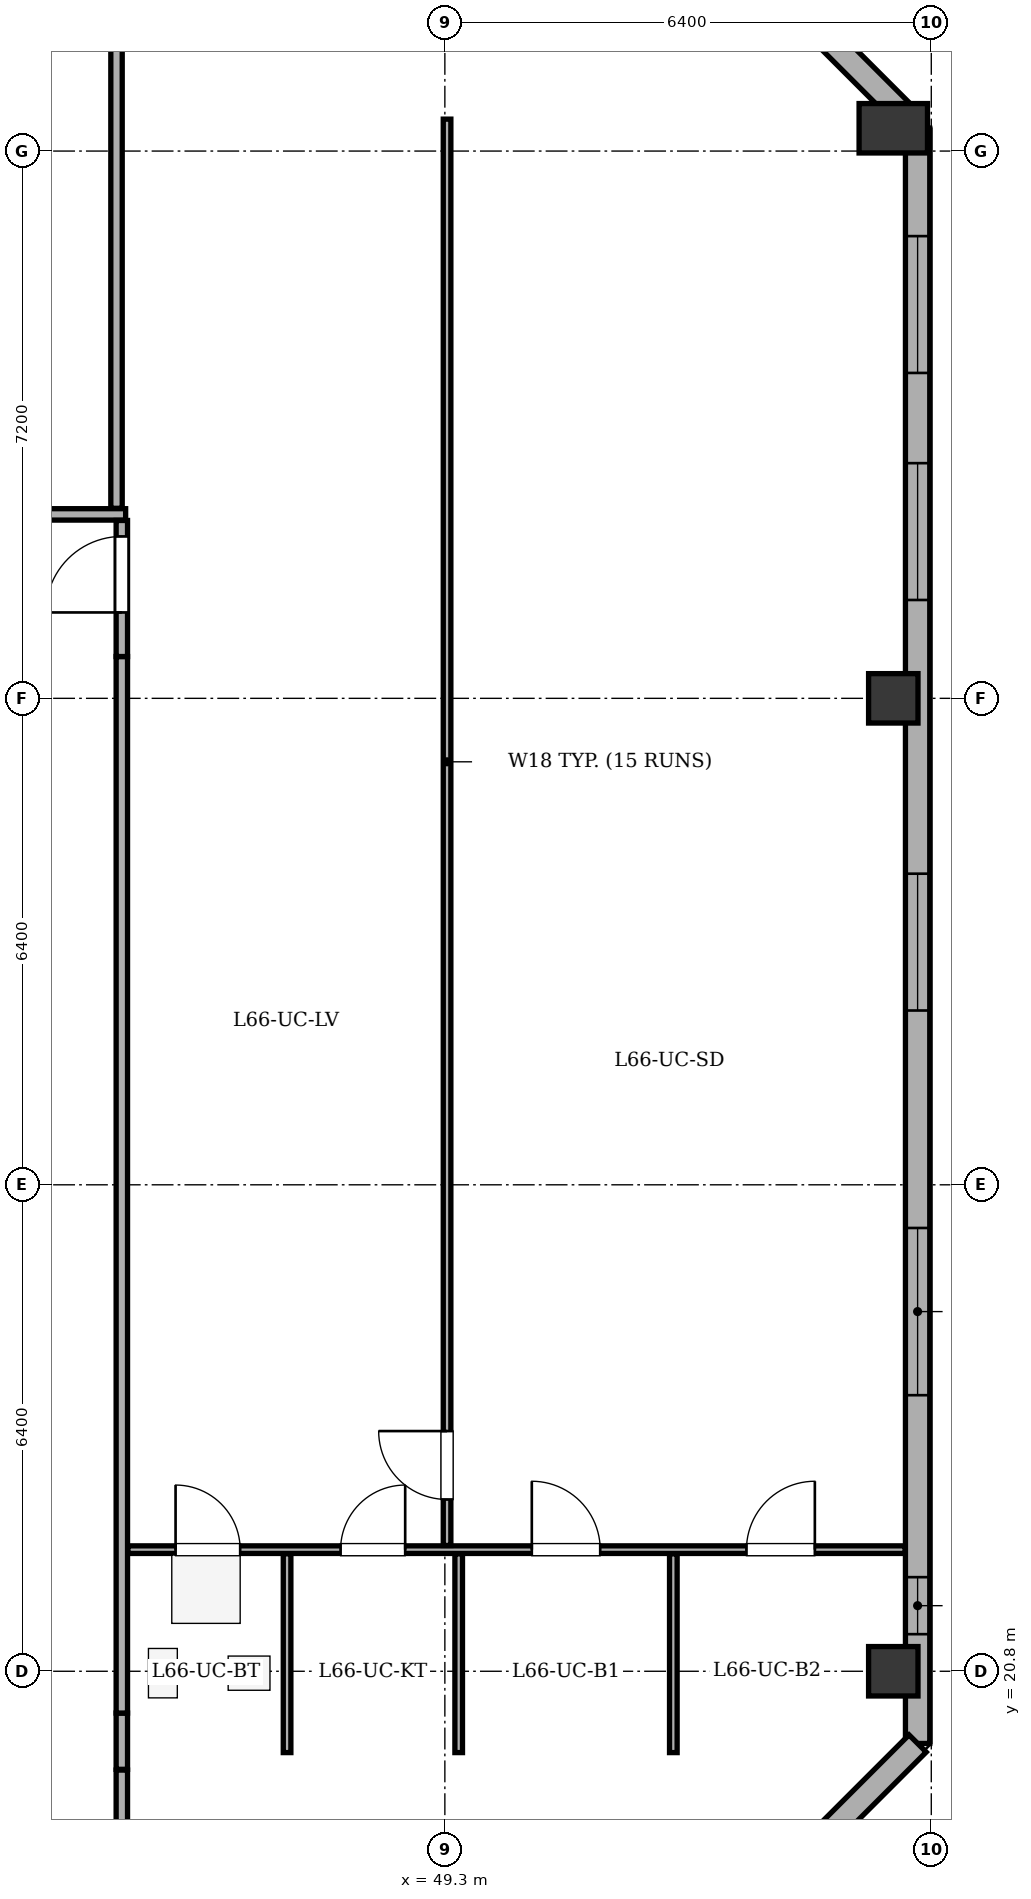
"""IFC4 building model, lengths in metres.
Left out: names, types, materials, properties, quantities, classifications, styles, units other than length and angle.
Written with IfcOpenShell. Run it as: python <this file> out.ifc"""

import sys

from ifc_helpers import new_model, si_unit, direction, frame, frame_2d, origin, origin_2d, place, context, subcontext, project, spatial, rectangle, extrude, element, fill, save


model = new_model("IFC4")
c1 = context("Model", 3, precision=1e-05, world=origin(), true_north=direction((0.0, 1.0)))
c2 = subcontext(c1, "Body", "Model", "MODEL_VIEW")
j1 = project(units=[si_unit("LENGTHUNIT", "METRE"), si_unit("PLANEANGLEUNIT", "RADIAN")], contexts=[c1])
p1 = place(None, origin())
s1 = spatial("IfcSite", under=j1, at=p1, CompositionType="ELEMENT")
p2 = place(p1, origin())
s2 = spatial("IfcBuilding", under=s1, at=p2, CompositionType="ELEMENT")
p3 = place(p2, frame((0.0, 0.0, 251.7)))
s3 = spatial("IfcBuildingStorey", under=s2, at=p3, CompositionType="ELEMENT", Elevation=251.7)
for number, where, z_axis, x_axis in (
    (1, (55.2, 20.8, 0.0), (0.0, 0.0, 1.0), (1.0, 0.0, 0.0)),
    (2, (55.2, 33.6, 0.0), (0.0, 0.0, 1.0), (1.0, 0.0, 0.0)),
):
    element("IfcColumn", number, at=place(p3, frame(where, z_axis=z_axis, x_axis=x_axis)), inside=s3, PredefinedType="COLUMN", context=c2, shape_type="SweptSolid", body=[
        extrude(rectangle(XDim=0.65, YDim=0.65, at=origin_2d()), origin(), (0.0, 0.0, 1.0), 3.4),
    ])
p4 = place(p3, frame((55.2, 41.1, 0.0), z_axis=(0.0, 0.0, 1.0), x_axis=(1.0, 0.0, 0.0)))
e3 = element("IfcColumn", 3, at=p4, inside=s3, PredefinedType="COLUMN", context=c2, shape_type="SweptSolid", body=[
    extrude(rectangle(XDim=0.65, YDim=0.9, at=origin_2d()), origin(), (0.0, 0.0, 1.0), 3.4),
])
p5 = place(p3, frame((51.7, 44.92, 0.0), z_axis=(0.0, 0.0, 1.0), x_axis=(0.70712937715, -0.707084184501, 0.0)))
e4 = element("IfcWall", 4, at=p5, inside=s3, PredefinedType="STANDARD", context=c2, shape_type="SweptSolid", body=[
    extrude(rectangle(XDim=5.402, YDim=0.32, at=frame_2d((2.701, 0.0))), origin(), (0.0, 0.0, 1.0), 2.725),
])
p6 = place(p5, frame((2.001, 0.0, 0.75)))
e5 = element("IfcOpeningElement", 5, at=p6, cuts=e4, PredefinedType="OPENING", context=c2, shape_type="SweptSolid", body=[
    extrude(rectangle(XDim=1.4, YDim=1.65, at=frame_2d((0.7, 0.825))), frame((0.0, 0.17, 0.0), z_axis=(0.0, -1.0, 0.0), x_axis=(1.0, 0.0, 0.0)), (0.0, 0.0, 1.0), 0.34),
])
p7 = place(p3, frame((55.52, 41.1, 0.0), z_axis=(0.0, 0.0, 1.0), x_axis=(0.0, -1.0, 0.0)))
e6 = element("IfcWall", 6, at=p7, inside=s3, PredefinedType="STANDARD", context=c2, shape_type="SweptSolid", body=[
    extrude(rectangle(XDim=21.25, YDim=0.32, at=frame_2d((10.625, 0.0))), origin(), (0.0, 0.0, 1.0), 2.725),
])
p8 = place(p7, frame((1.419, 0.0, 0.75)))
e7 = element("IfcOpeningElement", 7, at=p8, cuts=e6, PredefinedType="OPENING", context=c2, shape_type="SweptSolid", body=[
    extrude(rectangle(XDim=1.8, YDim=1.7, at=frame_2d((0.9, 0.85))), frame((0.0, 0.17, 0.0), z_axis=(0.0, -1.0, 0.0), x_axis=(1.0, 0.0, 0.0)), (0.0, 0.0, 1.0), 0.34),
])
p9 = place(p7, frame((4.406, 0.0, 0.75)))
e8 = element("IfcOpeningElement", 8, at=p9, cuts=e6, PredefinedType="OPENING", context=c2, shape_type="SweptSolid", body=[
    extrude(rectangle(XDim=1.8, YDim=1.7, at=frame_2d((0.9, 0.85))), frame((0.0, 0.17, 0.0), z_axis=(0.0, -1.0, 0.0), x_axis=(1.0, 0.0, 0.0)), (0.0, 0.0, 1.0), 0.34),
])
p10 = place(p7, frame((9.807, 0.0, 0.75)))
e9 = element("IfcOpeningElement", 9, at=p10, cuts=e6, PredefinedType="OPENING", context=c2, shape_type="SweptSolid", body=[
    extrude(rectangle(XDim=1.8, YDim=1.7, at=frame_2d((0.9, 0.85))), frame((0.0, 0.17, 0.0), z_axis=(0.0, -1.0, 0.0), x_axis=(1.0, 0.0, 0.0)), (0.0, 0.0, 1.0), 0.34),
])
p11 = place(p7, frame((14.468, 0.0, 0.75)))
e10 = element("IfcOpeningElement", 10, at=p11, cuts=e6, PredefinedType="OPENING", context=c2, shape_type="SweptSolid", body=[
    extrude(rectangle(XDim=2.2, YDim=1.7, at=frame_2d((1.1, 0.85))), frame((0.0, 0.17, 0.0), z_axis=(0.0, -1.0, 0.0), x_axis=(1.0, 0.0, 0.0)), (0.0, 0.0, 1.0), 0.34),
])
p12 = place(p7, frame((19.062, 0.0, 0.75)))
e11 = element("IfcOpeningElement", 11, at=p12, cuts=e6, PredefinedType="OPENING", context=c2, shape_type="SweptSolid", body=[
    extrude(rectangle(XDim=0.75, YDim=1.45, at=frame_2d((0.375, 0.725))), frame((0.0, 0.17, 0.0), z_axis=(0.0, -1.0, 0.0), x_axis=(1.0, 0.0, 0.0)), (0.0, 0.0, 1.0), 0.34),
])
p13 = place(p3, frame((55.52, 19.85, 0.0), z_axis=(0.0, 0.0, 1.0), x_axis=(-0.707106781187, -0.707106781187, 0.0)))
e12 = element("IfcWall", 12, at=p13, inside=s3, PredefinedType="STANDARD", context=c2, shape_type="SweptSolid", body=[
    extrude(rectangle(XDim=5.402, YDim=0.32, at=frame_2d((2.701, 0.0))), origin(), (0.0, 0.0, 1.0), 2.725),
])
p14 = place(p13, frame((2.001, 0.0, 0.75)))
e13 = element("IfcOpeningElement", 13, at=p14, cuts=e12, PredefinedType="OPENING", context=c2, shape_type="SweptSolid", body=[
    extrude(rectangle(XDim=1.4, YDim=1.65, at=frame_2d((0.7, 0.825))), frame((0.0, 0.17, 0.0), z_axis=(0.0, -1.0, 0.0), x_axis=(1.0, 0.0, 0.0)), (0.0, 0.0, 1.0), 0.34),
])
p15 = place(p3, frame((14.58, 36.02, 0.0), z_axis=(0.0, 0.0, 1.0), x_axis=(1.0, 0.0, 0.0)))
e14 = element("IfcWall", 14, at=p15, inside=s3, PredefinedType="PARTITIONING", context=c2, shape_type="SweptSolid", body=[
    extrude(rectangle(XDim=30.52, YDim=0.15, at=frame_2d((15.26, 0.0))), origin(), (0.0, 0.0, 1.0), 3.1),
])
p16 = place(p15, frame((6.585, 0.0, 0.0)))
e15 = element("IfcOpeningElement", 15, at=p16, cuts=e14, PredefinedType="OPENING", context=c2, shape_type="SweptSolid", body=[
    extrude(rectangle(XDim=1.0, YDim=2.1, at=frame_2d((0.5, 1.05))), frame((0.0, 0.085, 0.0), z_axis=(0.0, -1.0, 0.0), x_axis=(1.0, 0.0, 0.0)), (0.0, 0.0, 1.0), 0.17),
])
p17 = place(p15, frame((21.724, 0.0, 0.0)))
e16 = element("IfcOpeningElement", 16, at=p17, cuts=e14, PredefinedType="OPENING", context=c2, shape_type="SweptSolid", body=[
    extrude(rectangle(XDim=1.0, YDim=2.1, at=frame_2d((0.5, 1.05))), frame((0.0, 0.085, 0.0), z_axis=(0.0, -1.0, 0.0), x_axis=(1.0, 0.0, 0.0)), (0.0, 0.0, 1.0), 0.17),
])
p18 = place(p3, frame((44.98, 36.1, 0.0), z_axis=(0.0, 0.0, 1.0), x_axis=(0.0, 1.0, 0.0)))
e17 = element("IfcWall", 17, at=p18, inside=s3, PredefinedType="PARTITIONING", context=c2, shape_type="SweptSolid", body=[
    extrude(rectangle(XDim=8.655, YDim=0.15, at=frame_2d((4.327, 0.0))), origin(), (0.0, 0.0, 1.0), 2.725),
])
p19 = place(p3, frame((45.05, 19.5, 0.0), z_axis=(0.0, 0.0, 1.0), x_axis=(0.0, -1.0, 0.0)))
e18 = element("IfcWall", 18, at=p19, inside=s3, PredefinedType="PARTITIONING", context=c2, shape_type="SweptSolid", body=[
    extrude(rectangle(XDim=0.96, YDim=0.15, at=frame_2d((0.48, 0.0))), origin(), (0.0, 0.0, 1.0), 2.725),
])
p20 = place(p3, frame((45.05, 19.51, 0.0), z_axis=(0.0, 0.0, 1.0), x_axis=(0.0, 1.0, 0.0)))
e19 = element("IfcWall", 19, at=p20, inside=s3, PredefinedType="PARTITIONING", context=c2, shape_type="SweptSolid", body=[
    extrude(rectangle(XDim=0.74, YDim=0.15, at=frame_2d((0.37, 0.0))), origin(), (0.0, 0.0, 1.0), 2.725),
])
p21 = place(p3, frame((45.05, 20.25, 0.0), z_axis=(0.0, 0.0, 1.0), x_axis=(0.0, 1.0, 0.0)))
e20 = element("IfcWall", 20, at=p21, inside=s3, PredefinedType="PARTITIONING", context=c2, shape_type="SweptSolid", body=[
    extrude(rectangle(XDim=13.9, YDim=0.15, at=frame_2d((6.95, 0.0))), origin(), (0.0, 0.0, 1.0), 2.725),
])
p22 = place(p3, frame((45.05, 34.15, 0.0), z_axis=(0.0, 0.0, 1.0), x_axis=(0.0, 1.0, 0.0)))
e21 = element("IfcWall", 21, at=p22, inside=s3, PredefinedType="PARTITIONING", context=c2, shape_type="SweptSolid", body=[
    extrude(rectangle(XDim=1.79, YDim=0.15, at=frame_2d((0.895, 0.0))), origin(), (0.0, 0.0, 1.0), 2.725),
])
p23 = place(p22, frame((0.58, 0.0, 0.0)))
e22 = element("IfcOpeningElement", 22, at=p23, cuts=e21, PredefinedType="OPENING", context=c2, shape_type="SweptSolid", body=[
    extrude(rectangle(XDim=1.0, YDim=2.1, at=frame_2d((0.5, 1.05))), frame((0.0, 0.085, 0.0), z_axis=(0.0, -1.0, 0.0), x_axis=(1.0, 0.0, 0.0)), (0.0, 0.0, 1.0), 0.17),
])
p24 = place(p3, frame((45.13, 22.4, 0.0), z_axis=(0.0, 0.0, 1.0), x_axis=(1.0, 0.0, 0.0)))
e23 = element("IfcWall", 23, at=p24, inside=s3, PredefinedType="PARTITIONING", context=c2, shape_type="SweptSolid", body=[
    extrude(rectangle(XDim=10.225, YDim=0.1, at=frame_2d((5.113, 0.0))), origin(), (0.0, 0.0, 1.0), 3.1),
])
p25 = place(p24, frame((0.627, 0.0, 0.0)))
e24 = element("IfcOpeningElement", 24, at=p25, cuts=e23, PredefinedType="OPENING", context=c2, shape_type="SweptSolid", body=[
    extrude(rectangle(XDim=0.85, YDim=2.05, at=frame_2d((0.425, 1.025))), frame((0.0, 0.06, 0.0), z_axis=(0.0, -1.0, 0.0), x_axis=(1.0, 0.0, 0.0)), (0.0, 0.0, 1.0), 0.12),
])
p26 = place(p24, frame((2.798, 0.0, 0.0)))
e25 = element("IfcOpeningElement", 25, at=p26, cuts=e23, PredefinedType="OPENING", context=c2, shape_type="SweptSolid", body=[
    extrude(rectangle(XDim=0.85, YDim=2.05, at=frame_2d((0.425, 1.025))), frame((0.0, 0.06, 0.0), z_axis=(0.0, -1.0, 0.0), x_axis=(1.0, 0.0, 0.0)), (0.0, 0.0, 1.0), 0.12),
])
p27 = place(p24, frame((5.314, 0.0, 0.0)))
e26 = element("IfcOpeningElement", 26, at=p27, cuts=e23, PredefinedType="OPENING", context=c2, shape_type="SweptSolid", body=[
    extrude(rectangle(XDim=0.9, YDim=2.05, at=frame_2d((0.45, 1.025))), frame((0.0, 0.06, 0.0), z_axis=(0.0, -1.0, 0.0), x_axis=(1.0, 0.0, 0.0)), (0.0, 0.0, 1.0), 0.12),
])
p28 = place(p24, frame((8.138, 0.0, 0.0)))
e27 = element("IfcOpeningElement", 27, at=p28, cuts=e23, PredefinedType="OPENING", context=c2, shape_type="SweptSolid", body=[
    extrude(rectangle(XDim=0.9, YDim=2.05, at=frame_2d((0.45, 1.025))), frame((0.0, 0.06, 0.0), z_axis=(0.0, -1.0, 0.0), x_axis=(1.0, 0.0, 0.0)), (0.0, 0.0, 1.0), 0.12),
])
p29 = place(p3, frame((49.329, 22.455, 0.0), z_axis=(0.0, 0.0, 1.0), x_axis=(0.0, 1.0, 0.0)))
e28 = element("IfcWall", 28, at=p29, inside=s3, PredefinedType="PARTITIONING", context=c2, shape_type="SweptSolid", body=[
    extrude(rectangle(XDim=18.765, YDim=0.1, at=frame_2d((9.382, 0.0))), origin(), (0.0, 0.0, 1.0), 2.725),
])
p30 = place(p29, frame((0.605, 0.0, 0.0)))
e29 = element("IfcOpeningElement", 29, at=p30, cuts=e28, PredefinedType="OPENING", context=c2, shape_type="SweptSolid", body=[
    extrude(rectangle(XDim=0.9, YDim=2.05, at=frame_2d((0.45, 1.025))), frame((0.0, 0.06, 0.0), z_axis=(0.0, -1.0, 0.0), x_axis=(1.0, 0.0, 0.0)), (0.0, 0.0, 1.0), 0.12),
])
for number, where, z_axis, x_axis in (
    (30, (47.224, 19.73, 0.0), (0.0, 0.0, 1.0), (0.0, 1.0, 0.0)),
    (31, (49.482, 19.73, 0.0), (0.0, 0.0, 1.0), (0.0, 1.0, 0.0)),
):
    element("IfcWall", number, at=place(p3, frame(where, z_axis=z_axis, x_axis=x_axis)), inside=s3, PredefinedType="PARTITIONING", context=c2, shape_type="SweptSolid", body=[
        extrude(rectangle(XDim=2.615, YDim=0.1, at=frame_2d((1.308, 0.0))), origin(), (0.0, 0.0, 1.0), 2.725),
    ])
p31 = place(p3, frame((52.306, 19.73, 0.0), z_axis=(0.0, 0.0, 1.0), x_axis=(0.0, 1.0, 0.0)))
e32 = element("IfcWall", 32, at=p31, inside=s3, PredefinedType="PARTITIONING", context=c2, shape_type="SweptSolid", body=[
    extrude(rectangle(XDim=2.615, YDim=0.1, at=frame_2d((1.308, 0.0))), origin(), (0.0, 0.0, 1.0), 3.1),
])
p32 = place(p8, origin())
e33 = element("IfcWindow", 33, at=p32, inside=s3, PartitioningType="SINGLE_PANEL", PredefinedType="WINDOW", context=c2, shape_type="SweptSolid", body=[
    extrude(rectangle(XDim=1.8, YDim=1.7, at=frame_2d((0.9, 0.85))), frame((0.0, -0.01, 0.0), z_axis=(0.0, -1.0, 0.0), x_axis=(1.0, 0.0, 0.0)), (0.0, 0.0, 1.0), 0.06),
])
fill(e7, e33)
p33 = place(p9, origin())
e34 = element("IfcWindow", 34, at=p33, inside=s3, PartitioningType="SINGLE_PANEL", PredefinedType="WINDOW", context=c2, shape_type="SweptSolid", body=[
    extrude(rectangle(XDim=1.8, YDim=1.7, at=frame_2d((0.9, 0.85))), frame((0.0, -0.01, 0.0), z_axis=(0.0, -1.0, 0.0), x_axis=(1.0, 0.0, 0.0)), (0.0, 0.0, 1.0), 0.06),
])
fill(e8, e34)
p34 = place(p10, origin())
e35 = element("IfcWindow", 35, at=p34, inside=s3, PartitioningType="SINGLE_PANEL", PredefinedType="WINDOW", context=c2, shape_type="SweptSolid", body=[
    extrude(rectangle(XDim=1.8, YDim=1.7, at=frame_2d((0.9, 0.85))), frame((0.0, -0.01, 0.0), z_axis=(0.0, -1.0, 0.0), x_axis=(1.0, 0.0, 0.0)), (0.0, 0.0, 1.0), 0.06),
])
fill(e9, e35)
p35 = place(p11, origin())
e36 = element("IfcWindow", 36, at=p35, inside=s3, PartitioningType="SINGLE_PANEL", PredefinedType="WINDOW", context=c2, shape_type="SweptSolid", body=[
    extrude(rectangle(XDim=2.2, YDim=1.7, at=frame_2d((1.1, 0.85))), frame((0.0, -0.01, 0.0), z_axis=(0.0, -1.0, 0.0), x_axis=(1.0, 0.0, 0.0)), (0.0, 0.0, 1.0), 0.06),
])
fill(e10, e36)
p36 = place(p12, origin())
e37 = element("IfcWindow", 37, at=p36, inside=s3, PartitioningType="SINGLE_PANEL", PredefinedType="WINDOW", context=c2, shape_type="SweptSolid", body=[
    extrude(rectangle(XDim=0.75, YDim=1.45, at=frame_2d((0.375, 0.725))), frame((0.0, -0.01, 0.0), z_axis=(0.0, -1.0, 0.0), x_axis=(1.0, 0.0, 0.0)), (0.0, 0.0, 1.0), 0.06),
])
fill(e11, e37)
p37 = place(p23, origin())
e38 = element("IfcDoor", 38, at=p37, inside=s3, OperationType="SINGLE_SWING_LEFT", PredefinedType="DOOR", context=c2, shape_type="SweptSolid", body=[
    extrude(rectangle(XDim=1.0, YDim=2.1, at=frame_2d((0.5, 1.05))), frame((0.0, 0.025, 0.0), z_axis=(0.0, -1.0, 0.0), x_axis=(1.0, 0.0, 0.0)), (0.0, 0.0, 1.0), 0.05),
])
fill(e22, e38)
p38 = place(p30, origin())
e39 = element("IfcDoor", 39, at=p38, inside=s3, OperationType="SINGLE_SWING_RIGHT", PredefinedType="DOOR", context=c2, shape_type="SweptSolid", body=[
    extrude(rectangle(XDim=0.9, YDim=2.05, at=frame_2d((0.45, 1.025))), frame((0.0, 0.025, 0.0), z_axis=(0.0, -1.0, 0.0), x_axis=(1.0, 0.0, 0.0)), (0.0, 0.0, 1.0), 0.05),
])
fill(e29, e39)
p39 = place(p25, origin())
e40 = element("IfcDoor", 40, at=p39, inside=s3, OperationType="SINGLE_SWING_LEFT", PredefinedType="DOOR", context=c2, shape_type="SweptSolid", body=[
    extrude(rectangle(XDim=0.85, YDim=2.05, at=frame_2d((0.425, 1.025))), frame((0.0, 0.025, 0.0), z_axis=(0.0, -1.0, 0.0), x_axis=(1.0, 0.0, 0.0)), (0.0, 0.0, 1.0), 0.05),
])
fill(e24, e40)
p40 = place(p26, origin())
e41 = element("IfcDoor", 41, at=p40, inside=s3, OperationType="SINGLE_SWING_RIGHT", PredefinedType="DOOR", context=c2, shape_type="SweptSolid", body=[
    extrude(rectangle(XDim=0.85, YDim=2.05, at=frame_2d((0.425, 1.025))), frame((0.0, 0.025, 0.0), z_axis=(0.0, -1.0, 0.0), x_axis=(1.0, 0.0, 0.0)), (0.0, 0.0, 1.0), 0.05),
])
fill(e25, e41)
p41 = place(p27, origin())
e42 = element("IfcDoor", 42, at=p41, inside=s3, OperationType="SINGLE_SWING_LEFT", PredefinedType="DOOR", context=c2, shape_type="SweptSolid", body=[
    extrude(rectangle(XDim=0.9, YDim=2.05, at=frame_2d((0.45, 1.025))), frame((0.0, 0.025, 0.0), z_axis=(0.0, -1.0, 0.0), x_axis=(1.0, 0.0, 0.0)), (0.0, 0.0, 1.0), 0.05),
])
fill(e26, e42)
p42 = place(p28, origin())
e43 = element("IfcDoor", 43, at=p42, inside=s3, OperationType="SINGLE_SWING_RIGHT", PredefinedType="DOOR", context=c2, shape_type="SweptSolid", body=[
    extrude(rectangle(XDim=0.9, YDim=2.05, at=frame_2d((0.45, 1.025))), frame((0.0, 0.025, 0.0), z_axis=(0.0, -1.0, 0.0), x_axis=(1.0, 0.0, 0.0)), (0.0, 0.0, 1.0), 0.05),
])
fill(e27, e43)
save(model, sys.argv[1])
